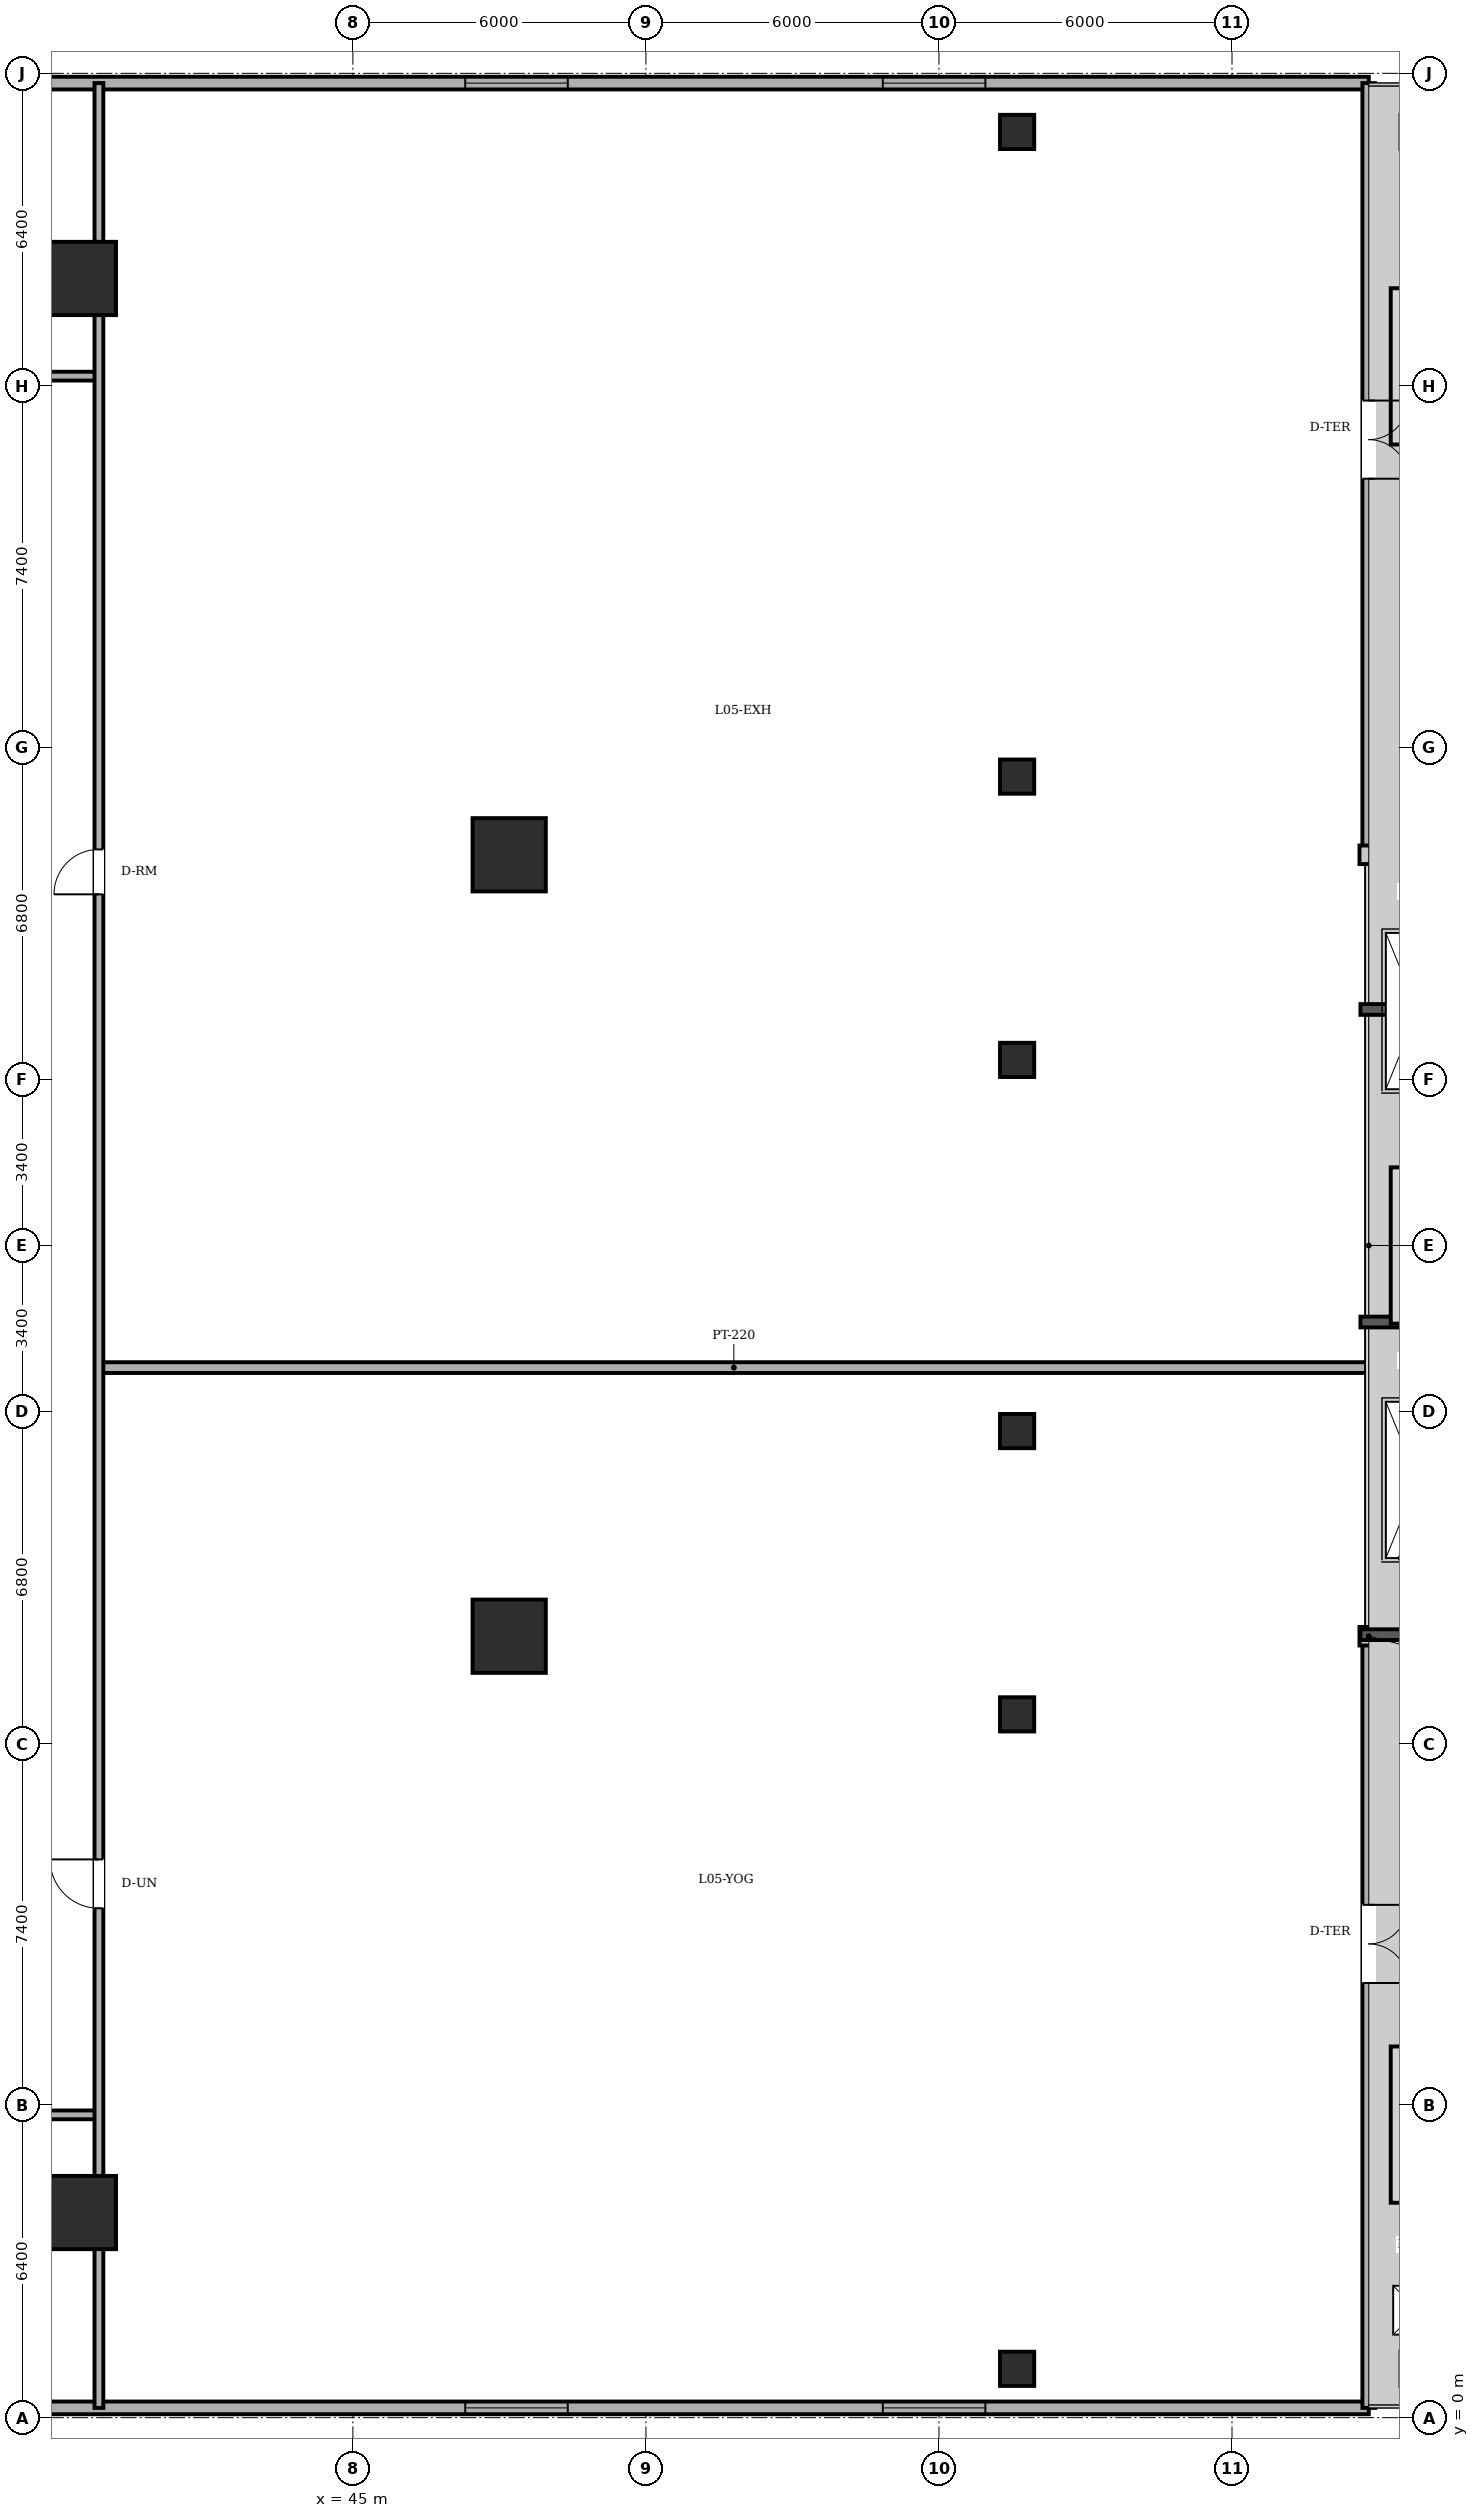
"""IFC4 building model, lengths in metres.
Left out: names, types, materials, properties, quantities, classifications, styles, units other than length and angle.
Written with IfcOpenShell. Run it as: python <this file> out.ifc"""

import sys

from ifc_helpers import new_model, si_unit, direction, frame, frame_2d, origin, origin_2d, place, context, subcontext, project, spatial, rectangle, circle, extrude, element, fill, save


model = new_model("IFC4")
c1 = context("Model", 3, precision=1e-05, world=origin(), true_north=direction((0.0, 1.0)))
c2 = subcontext(c1, "Body", "Model", "MODEL_VIEW")
j1 = project(units=[si_unit("LENGTHUNIT", "METRE"), si_unit("PLANEANGLEUNIT", "RADIAN")], contexts=[c1])
p1 = place(None, origin())
s1 = spatial("IfcSite", under=j1, at=p1, CompositionType="ELEMENT")
p2 = place(p1, origin())
s2 = spatial("IfcBuilding", under=s1, at=p2, CompositionType="ELEMENT")
p3 = place(p2, frame((0.0, 0.0, 19.35)))
s3 = spatial("IfcBuildingStorey", under=s2, at=p3, CompositionType="ELEMENT", Elevation=19.35)
for number, where, z_axis, x_axis in (
    (1, (39.4, 4.2, 0.0), (0.0, 0.0, 1.0), (1.0, 0.0, 0.0)),
    (2, (48.2, 16.0, 0.0), (0.0, 0.0, 1.0), (1.0, 0.0, 0.0)),
    (3, (48.2, 32.0, 0.0), (0.0, 0.0, 1.0), (1.0, 0.0, 0.0)),
    (4, (39.4, 43.8, 0.0), (0.0, 0.0, 1.0), (1.0, 0.0, 0.0)),
):
    element("IfcColumn", number, at=place(p3, frame(where, z_axis=z_axis, x_axis=x_axis)), inside=s3, PredefinedType="COLUMN", context=c2, shape_type="SweptSolid", body=[
        extrude(circle(Radius=0.75, at=origin_2d()), origin(), (0.0, 0.0, 1.0), 4.65),
    ])
for number, where, z_axis, x_axis in (
    (5, (58.6, 1.0, 0.0), (0.0, 0.0, 1.0), (1.0, 0.0, 0.0)),
    (6, (58.6, 46.8, 0.0), (0.0, 0.0, 1.0), (1.0, 0.0, 0.0)),
    (7, (58.6, 20.2, 0.0), (0.0, 0.0, 1.0), (1.0, 0.0, 0.0)),
    (8, (58.6, 27.8, 0.0), (0.0, 0.0, 1.0), (1.0, 0.0, 0.0)),
    (9, (58.6, 14.4, 0.0), (0.0, 0.0, 1.0), (1.0, 0.0, 0.0)),
    (10, (58.6, 33.6, 0.0), (0.0, 0.0, 1.0), (1.0, 0.0, 0.0)),
):
    element("IfcColumn", number, at=place(p3, frame(where, z_axis=z_axis, x_axis=x_axis)), inside=s3, PredefinedType="COLUMN", context=c2, shape_type="SweptSolid", body=[
        extrude(rectangle(XDim=0.7, YDim=0.7, at=origin_2d()), origin(), (0.0, 0.0, 1.0), 4.65),
    ])
p4 = place(p3, frame((65.8, 0.2, 0.0), z_axis=(0.0, 0.0, 1.0), x_axis=(-1.0, 0.0, 0.0)))
e11 = element("IfcWall", 11, at=p4, inside=s3, PredefinedType="SOLIDWALL", context=c2, shape_type="SweptSolid", body=[
    extrude(rectangle(XDim=64.2, YDim=0.26, at=frame_2d((32.1, 0.0))), origin(), (0.0, 0.0, 1.0), 4.41),
])
p5 = place(p4, frame((7.85, 0.0, 0.9)))
e12 = element("IfcOpeningElement", 12, at=p5, cuts=e11, PredefinedType="OPENING", context=c2, shape_type="SweptSolid", body=[
    extrude(rectangle(XDim=2.1, YDim=2.0, at=frame_2d((1.05, 1.0))), frame((0.0, 0.14, 0.0), z_axis=(0.0, -1.0, 0.0), x_axis=(1.0, 0.0, 0.0)), (0.0, 0.0, 1.0), 0.28),
])
p6 = place(p4, frame((16.4, 0.0, 0.9)))
e13 = element("IfcOpeningElement", 13, at=p6, cuts=e11, PredefinedType="OPENING", context=c2, shape_type="SweptSolid", body=[
    extrude(rectangle(XDim=2.1, YDim=2.0, at=frame_2d((1.05, 1.0))), frame((0.0, 0.14, 0.0), z_axis=(0.0, -1.0, 0.0), x_axis=(1.0, 0.0, 0.0)), (0.0, 0.0, 1.0), 0.28),
])
p7 = place(p4, frame((31.083, 0.0, 0.9)))
e14 = element("IfcOpeningElement", 14, at=p7, cuts=e11, PredefinedType="OPENING", context=c2, shape_type="SweptSolid", body=[
    extrude(rectangle(XDim=2.1, YDim=2.0, at=frame_2d((1.05, 1.0))), frame((0.0, 0.14, 0.0), z_axis=(0.0, -1.0, 0.0), x_axis=(1.0, 0.0, 0.0)), (0.0, 0.0, 1.0), 0.28),
])
p8 = place(p4, frame((37.217, 0.0, 0.9)))
e15 = element("IfcOpeningElement", 15, at=p8, cuts=e11, PredefinedType="OPENING", context=c2, shape_type="SweptSolid", body=[
    extrude(rectangle(XDim=2.1, YDim=2.0, at=frame_2d((1.05, 1.0))), frame((0.0, 0.14, 0.0), z_axis=(0.0, -1.0, 0.0), x_axis=(1.0, 0.0, 0.0)), (0.0, 0.0, 1.0), 0.28),
])
p9 = place(p4, frame((49.833, 0.0, 0.9)))
e16 = element("IfcOpeningElement", 16, at=p9, cuts=e11, PredefinedType="OPENING", context=c2, shape_type="SweptSolid", body=[
    extrude(rectangle(XDim=2.1, YDim=2.0, at=frame_2d((1.05, 1.0))), frame((0.0, 0.14, 0.0), z_axis=(0.0, -1.0, 0.0), x_axis=(1.0, 0.0, 0.0)), (0.0, 0.0, 1.0), 0.28),
])
p10 = place(p3, frame((1.6, 47.8, 0.0), z_axis=(0.0, 0.0, 1.0), x_axis=(1.0, 0.0, 0.0)))
e17 = element("IfcWall", 17, at=p10, inside=s3, PredefinedType="SOLIDWALL", context=c2, shape_type="SweptSolid", body=[
    extrude(rectangle(XDim=64.2, YDim=0.26, at=frame_2d((32.1, 0.0))), origin(), (0.0, 0.0, 1.0), 4.41),
])
p11 = place(p10, frame((11.917, 0.0, 0.9)))
e18 = element("IfcOpeningElement", 18, at=p11, cuts=e17, PredefinedType="OPENING", context=c2, shape_type="SweptSolid", body=[
    extrude(rectangle(XDim=2.1, YDim=2.0, at=frame_2d((1.05, 1.0))), frame((0.0, 0.14, 0.0), z_axis=(0.0, -1.0, 0.0), x_axis=(1.0, 0.0, 0.0)), (0.0, 0.0, 1.0), 0.28),
])
p12 = place(p10, frame((24.533, 0.0, 0.9)))
e19 = element("IfcOpeningElement", 19, at=p12, cuts=e17, PredefinedType="OPENING", context=c2, shape_type="SweptSolid", body=[
    extrude(rectangle(XDim=2.1, YDim=2.0, at=frame_2d((1.05, 1.0))), frame((0.0, 0.14, 0.0), z_axis=(0.0, -1.0, 0.0), x_axis=(1.0, 0.0, 0.0)), (0.0, 0.0, 1.0), 0.28),
])
p13 = place(p10, frame((45.7, 0.0, 0.9)))
e20 = element("IfcOpeningElement", 20, at=p13, cuts=e17, PredefinedType="OPENING", context=c2, shape_type="SweptSolid", body=[
    extrude(rectangle(XDim=2.1, YDim=2.0, at=frame_2d((1.05, 1.0))), frame((0.0, 0.14, 0.0), z_axis=(0.0, -1.0, 0.0), x_axis=(1.0, 0.0, 0.0)), (0.0, 0.0, 1.0), 0.28),
])
p14 = place(p10, frame((54.25, 0.0, 0.9)))
e21 = element("IfcOpeningElement", 21, at=p14, cuts=e17, PredefinedType="OPENING", context=c2, shape_type="SweptSolid", body=[
    extrude(rectangle(XDim=2.1, YDim=2.0, at=frame_2d((1.05, 1.0))), frame((0.0, 0.14, 0.0), z_axis=(0.0, -1.0, 0.0), x_axis=(1.0, 0.0, 0.0)), (0.0, 0.0, 1.0), 0.28),
])
p15 = place(p3, frame((65.8, 16.0, 0.0), z_axis=(0.0, 0.0, 1.0), x_axis=(0.0, -1.0, 0.0)))
e22 = element("IfcWall", 22, at=p15, inside=s3, PredefinedType="SOLIDWALL", context=c2, shape_type="SweptSolid", body=[
    extrude(rectangle(XDim=15.8, YDim=0.26, at=frame_2d((7.9, 0.0))), origin(), (0.0, 0.0, 1.0), 4.41),
])
p16 = place(p15, frame((5.5, 0.0, 0.0)))
e23 = element("IfcOpeningElement", 23, at=p16, cuts=e22, PredefinedType="OPENING", context=c2, shape_type="SweptSolid", body=[
    extrude(rectangle(XDim=1.6, YDim=2.3, at=frame_2d((0.8, 1.15))), frame((0.0, 0.14, 0.0), z_axis=(0.0, -1.0, 0.0), x_axis=(1.0, 0.0, 0.0)), (0.0, 0.0, 1.0), 0.28),
])
p17 = place(p3, frame((65.8, 47.8, 0.0), z_axis=(0.0, 0.0, 1.0), x_axis=(0.0, -1.0, 0.0)))
e24 = element("IfcWall", 24, at=p17, inside=s3, PredefinedType="SOLIDWALL", context=c2, shape_type="SweptSolid", body=[
    extrude(rectangle(XDim=15.8, YDim=0.26, at=frame_2d((7.9, 0.0))), origin(), (0.0, 0.0, 1.0), 4.41),
])
p18 = place(p17, frame((6.5, 0.0, 0.0)))
e25 = element("IfcOpeningElement", 25, at=p18, cuts=e24, PredefinedType="OPENING", context=c2, shape_type="SweptSolid", body=[
    extrude(rectangle(XDim=1.6, YDim=2.3, at=frame_2d((0.8, 1.15))), frame((0.0, 0.14, 0.0), z_axis=(0.0, -1.0, 0.0), x_axis=(1.0, 0.0, 0.0)), (0.0, 0.0, 1.0), 0.28),
])
p19 = place(p3, frame((17.89, 6.2, 0.0), z_axis=(0.0, 0.0, 1.0), x_axis=(1.0, 0.0, 0.0)))
e26 = element("IfcWall", 26, at=p19, inside=s3, PredefinedType="PARTITIONING", context=c2, shape_type="SweptSolid", body=[
    extrude(rectangle(XDim=21.91, YDim=0.18, at=frame_2d((10.955, 0.0))), origin(), (0.0, 0.0, 1.0), 4.41),
])
p20 = place(p3, frame((39.8, 21.5, 0.0), z_axis=(0.0, 0.0, 1.0), x_axis=(1.0, 0.0, 0.0)))
e27 = element("IfcWall", 27, at=p20, inside=s3, PredefinedType="PARTITIONING", context=c2, shape_type="SweptSolid", body=[
    extrude(rectangle(XDim=26.0, YDim=0.22, at=frame_2d((13.0, 0.0))), origin(), (0.0, 0.0, 1.0), 4.41),
])
p21 = place(p3, frame((17.89, 41.8, 0.0), z_axis=(0.0, 0.0, 1.0), x_axis=(1.0, 0.0, 0.0)))
e28 = element("IfcWall", 28, at=p21, inside=s3, PredefinedType="PARTITIONING", context=c2, shape_type="SweptSolid", body=[
    extrude(rectangle(XDim=21.91, YDim=0.18, at=frame_2d((10.955, 0.0))), origin(), (0.0, 0.0, 1.0), 4.41),
])
p22 = place(p3, frame((39.8, 0.2, 0.0), z_axis=(0.0, 0.0, 1.0), x_axis=(0.0, 1.0, 0.0)))
e29 = element("IfcWall", 29, at=p22, inside=s3, PredefinedType="PARTITIONING", context=c2, shape_type="SweptSolid", body=[
    extrude(rectangle(XDim=47.6, YDim=0.18, at=frame_2d((23.8, 0.0))), origin(), (0.0, 0.0, 1.0), 4.41),
])
p23 = place(p22, frame((10.23, 0.0, 0.0)))
e30 = element("IfcOpeningElement", 30, at=p23, cuts=e29, PredefinedType="OPENING", context=c2, shape_type="SweptSolid", body=[
    extrude(rectangle(XDim=1.0, YDim=2.15, at=frame_2d((0.5, 1.075))), frame((0.0, 0.1, 0.0), z_axis=(0.0, -1.0, 0.0), x_axis=(1.0, 0.0, 0.0)), (0.0, 0.0, 1.0), 0.2),
])
p24 = place(p22, frame((30.99, 0.0, 0.0)))
e31 = element("IfcOpeningElement", 31, at=p24, cuts=e29, PredefinedType="OPENING", context=c2, shape_type="SweptSolid", body=[
    extrude(rectangle(XDim=0.92, YDim=2.1, at=frame_2d((0.46, 1.05))), frame((0.0, 0.1, 0.0), z_axis=(0.0, -1.0, 0.0), x_axis=(1.0, 0.0, 0.0)), (0.0, 0.0, 1.0), 0.2),
])
p25 = place(p16, origin())
e32 = element("IfcDoor", 32, at=p25, inside=s3, OperationType="DOUBLE_DOOR_SINGLE_SWING", PredefinedType="DOOR", context=c2, shape_type="SweptSolid", body=[
    extrude(rectangle(XDim=1.6, YDim=2.3, at=frame_2d((0.8, 1.15))), frame((0.0, 0.025, 0.0), z_axis=(0.0, -1.0, 0.0), x_axis=(1.0, 0.0, 0.0)), (0.0, 0.0, 1.0), 0.05),
])
fill(e23, e32)
p26 = place(p18, origin())
e33 = element("IfcDoor", 33, at=p26, inside=s3, OperationType="DOUBLE_DOOR_SINGLE_SWING", PredefinedType="DOOR", context=c2, shape_type="SweptSolid", body=[
    extrude(rectangle(XDim=1.6, YDim=2.3, at=frame_2d((0.8, 1.15))), frame((0.0, 0.025, 0.0), z_axis=(0.0, -1.0, 0.0), x_axis=(1.0, 0.0, 0.0)), (0.0, 0.0, 1.0), 0.05),
])
fill(e25, e33)
p27 = place(p13, origin())
e34 = element("IfcWindow", 34, at=p27, inside=s3, PartitioningType="DOUBLE_PANEL_VERTICAL", PredefinedType="WINDOW", context=c2, shape_type="SweptSolid", body=[
    extrude(rectangle(XDim=2.1, YDim=2.0, at=frame_2d((1.05, 1.0))), frame((0.0, 0.03, 0.0), z_axis=(0.0, -1.0, 0.0), x_axis=(1.0, 0.0, 0.0)), (0.0, 0.0, 1.0), 0.06),
])
fill(e20, e34)
p28 = place(p14, origin())
e35 = element("IfcWindow", 35, at=p28, inside=s3, PartitioningType="DOUBLE_PANEL_VERTICAL", PredefinedType="WINDOW", context=c2, shape_type="SweptSolid", body=[
    extrude(rectangle(XDim=2.1, YDim=2.0, at=frame_2d((1.05, 1.0))), frame((0.0, 0.03, 0.0), z_axis=(0.0, -1.0, 0.0), x_axis=(1.0, 0.0, 0.0)), (0.0, 0.0, 1.0), 0.06),
])
fill(e21, e35)
p29 = place(p5, origin())
e36 = element("IfcWindow", 36, at=p29, inside=s3, PartitioningType="DOUBLE_PANEL_VERTICAL", PredefinedType="WINDOW", context=c2, shape_type="SweptSolid", body=[
    extrude(rectangle(XDim=2.1, YDim=2.0, at=frame_2d((1.05, 1.0))), frame((0.0, 0.03, 0.0), z_axis=(0.0, -1.0, 0.0), x_axis=(1.0, 0.0, 0.0)), (0.0, 0.0, 1.0), 0.06),
])
fill(e12, e36)
p30 = place(p6, origin())
e37 = element("IfcWindow", 37, at=p30, inside=s3, PartitioningType="DOUBLE_PANEL_VERTICAL", PredefinedType="WINDOW", context=c2, shape_type="SweptSolid", body=[
    extrude(rectangle(XDim=2.1, YDim=2.0, at=frame_2d((1.05, 1.0))), frame((0.0, 0.03, 0.0), z_axis=(0.0, -1.0, 0.0), x_axis=(1.0, 0.0, 0.0)), (0.0, 0.0, 1.0), 0.06),
])
fill(e13, e37)
p31 = place(p3, frame((0.0, 0.0, -0.21)))
p32 = place(p31, frame((66.8, 19.2, 0.0)))
p33 = place(p32, frame((0.0, 0.0, 0.16)))
e38 = element("IfcWindow", 38, at=p33, inside=s3, PartitioningType="SINGLE_PANEL", PredefinedType="SKYLIGHT", context=c2, shape_type="SweptSolid", body=[
    extrude(rectangle(XDim=1.3, YDim=3.2, at=origin_2d()), origin(), (0.0, 0.0, 1.0), 0.05),
])
p34 = place(p31, frame((66.8, 28.8, 0.0)))
p35 = place(p34, frame((0.0, 0.0, 0.16)))
e39 = element("IfcWindow", 39, at=p35, inside=s3, PartitioningType="SINGLE_PANEL", PredefinedType="SKYLIGHT", context=c2, shape_type="SweptSolid", body=[
    extrude(rectangle(XDim=1.3, YDim=3.2, at=origin_2d()), origin(), (0.0, 0.0, 1.0), 0.05),
])
p36 = place(p31, frame((66.8, 2.2, 0.0)))
p37 = place(p36, frame((0.0, 0.0, 0.16)))
e40 = element("IfcDoor", 40, at=p37, inside=s3, OperationType="SINGLE_SWING_LEFT", PredefinedType="TRAPDOOR", context=c2, shape_type="SweptSolid", body=[
    extrude(rectangle(XDim=1.0, YDim=1.0, at=origin_2d()), origin(), (0.0, 0.0, 1.0), 0.05),
])
p38 = place(p23, origin())
e41 = element("IfcDoor", 41, at=p38, inside=s3, OperationType="SINGLE_SWING_RIGHT", PredefinedType="DOOR", context=c2, shape_type="SweptSolid", body=[
    extrude(rectangle(XDim=1.0, YDim=2.15, at=frame_2d((0.5, 1.075))), frame((0.0, 0.025, 0.0), z_axis=(0.0, -1.0, 0.0), x_axis=(1.0, 0.0, 0.0)), (0.0, 0.0, 1.0), 0.05),
])
fill(e30, e41)
p39 = place(p24, origin())
e42 = element("IfcDoor", 42, at=p39, inside=s3, OperationType="SINGLE_SWING_LEFT", PredefinedType="DOOR", context=c2, shape_type="SweptSolid", body=[
    extrude(rectangle(XDim=0.92, YDim=2.1, at=frame_2d((0.46, 1.05))), frame((0.0, 0.025, 0.0), z_axis=(0.0, -1.0, 0.0), x_axis=(1.0, 0.0, 0.0)), (0.0, 0.0, 1.0), 0.05),
])
fill(e31, e42)
save(model, sys.argv[1])
